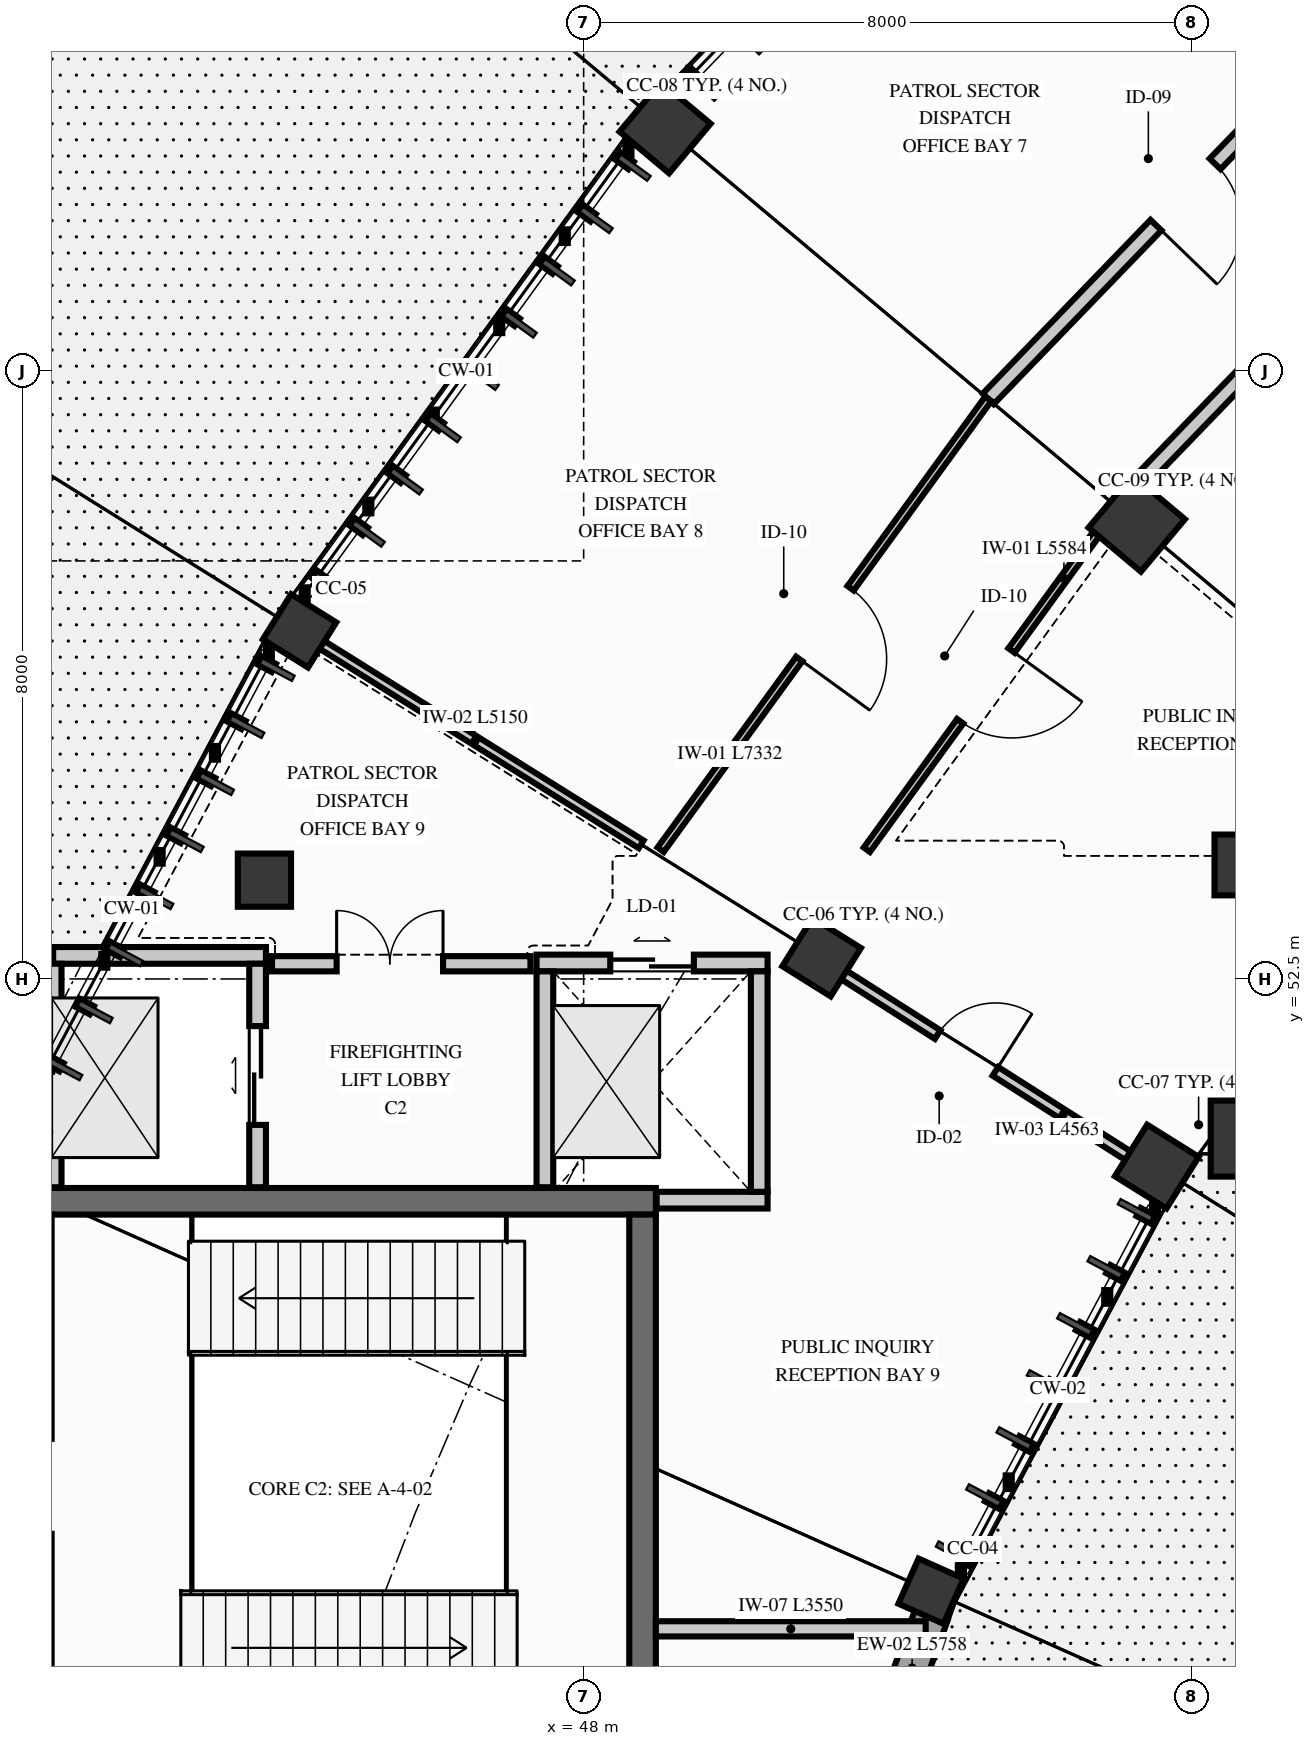
"""IFC4 building model, lengths in metres.
Left out: names, types, materials, properties, quantities, classifications, styles, units other than length and angle.
Written with IfcOpenShell. Run it as: python <this file> out.ifc"""

import sys

from ifc_helpers import new_model, si_unit, direction, frame, frame_2d, origin, origin_2d, place, context, subcontext, project, spatial, rectangle, extrude, element, fill, save


model = new_model("IFC4")
c1 = context("Model", 3, precision=1e-05, world=origin(), true_north=direction((0.0, 1.0)))
c2 = subcontext(c1, "Body", "Model", "MODEL_VIEW")
j1 = project(units=[si_unit("LENGTHUNIT", "METRE"), si_unit("PLANEANGLEUNIT", "RADIAN")], contexts=[c1])
p1 = place(None, origin())
s1 = spatial("IfcSite", under=j1, at=p1, CompositionType="ELEMENT")
p2 = place(p1, origin())
s2 = spatial("IfcBuilding", under=s1, at=p2, CompositionType="ELEMENT")
p3 = place(p2, origin())
s3 = spatial("IfcBuildingStorey", under=s2, at=p3, CompositionType="ELEMENT", Elevation=0.0)
p4 = place(p3, frame((40.65, 49.575, 0.0), z_axis=(0.0, 0.0, 1.0), x_axis=(1.0, 0.0, 0.0)))
e1 = element("IfcWall", 1, at=p4, inside=s3, PredefinedType="SHEAR", context=c2, shape_type="SweptSolid", body=[
    extrude(rectangle(XDim=8.3, YDim=0.35, at=frame_2d((4.15, 0.0))), origin(), (0.0, 0.0, 1.0), 4.88),
])
p5 = place(p3, frame((48.775, 42.6, 0.0), z_axis=(0.0, 0.0, 1.0), x_axis=(0.0, 1.0, 0.0)))
e2 = element("IfcWall", 2, at=p5, inside=s3, PredefinedType="SHEAR", context=c2, shape_type="SweptSolid", body=[
    extrude(rectangle(XDim=6.8, YDim=0.35, at=frame_2d((3.4, 0.0))), origin(), (0.0, 0.0, 1.0), 4.88),
])
p6 = place(p3, frame((55.277, 58.493, 0.0), z_axis=(0.0, 0.0, 1.0), x_axis=(0.642787609687, 0.766044443119, 0.0)))
e3 = element("IfcColumn", 3, at=p6, inside=s3, PredefinedType="COLUMN", context=c2, shape_type="SweptSolid", body=[
    extrude(rectangle(XDim=0.9, YDim=0.9, at=origin_2d()), origin(), (0.0, 0.0, 1.0), 5.1),
])
p7 = place(p3, frame((49.072, 63.699, 0.0), z_axis=(0.0, 0.0, 1.0), x_axis=(0.642787609687, 0.766044443119, 0.0)))
e4 = element("IfcColumn", 4, at=p7, inside=s3, PredefinedType="COLUMN", context=c2, shape_type="SweptSolid", body=[
    extrude(rectangle(XDim=0.85, YDim=0.85, at=origin_2d()), origin(), (0.0, 0.0, 1.0), 5.1),
])
p8 = place(p3, frame((55.541, 50.032, 0.0), z_axis=(0.0, 0.0, 1.0), x_axis=(0.529919264233, 0.848048096156, 0.0)))
e5 = element("IfcColumn", 5, at=p8, inside=s3, PredefinedType="COLUMN", context=c2, shape_type="SweptSolid", body=[
    extrude(rectangle(XDim=0.8, YDim=0.8, at=origin_2d()), origin(), (0.0, 0.0, 1.0), 5.1),
])
p9 = place(p3, frame((51.131, 52.787, 0.0), z_axis=(0.0, 0.0, 1.0), x_axis=(0.529919264233, 0.848048096156, 0.0)))
e6 = element("IfcColumn", 6, at=p9, inside=s3, PredefinedType="COLUMN", context=c2, shape_type="SweptSolid", body=[
    extrude(rectangle(XDim=0.75, YDim=0.75, at=origin_2d()), origin(), (0.0, 0.0, 1.0), 5.1),
])
p10 = place(p3, frame((44.262, 57.08, 0.0), z_axis=(0.0, 0.0, 1.0), x_axis=(0.529919264233, 0.848048096156, 0.0)))
e7 = element("IfcColumn", 7, at=p10, inside=s3, PredefinedType="COLUMN", context=c2, shape_type="SweptSolid", body=[
    extrude(rectangle(XDim=0.7, YDim=0.7, at=origin_2d()), origin(), (0.0, 0.0, 1.0), 5.1),
])
p11 = place(p3, frame((52.571, 44.446, 0.0), z_axis=(0.0, 0.0, 1.0), x_axis=(0.406736643076, 0.913545457643, 0.0)))
e8 = element("IfcColumn", 8, at=p11, inside=s3, PredefinedType="COLUMN", context=c2, shape_type="SweptSolid", body=[
    extrude(rectangle(XDim=0.65, YDim=0.65, at=origin_2d()), origin(), (0.0, 0.0, 1.0), 5.1),
])
p12 = place(p3, frame((43.8, 53.8, 0.0), z_axis=(0.0, 0.0, 1.0), x_axis=(1.0, 0.0, 0.0)))
e9 = element("IfcColumn", 9, at=p12, inside=s3, PredefinedType="COLUMN", context=c2, shape_type="SweptSolid", body=[
    extrude(rectangle(XDim=0.7, YDim=0.7, at=origin_2d()), origin(), (0.0, 0.0, 1.0), 5.1),
])
p13 = place(p3, frame((56.6, 54.0, 0.0), z_axis=(0.0, 0.0, 1.0), x_axis=(1.0, 0.0, 0.0)))
e10 = element("IfcColumn", 10, at=p13, inside=s3, PredefinedType="COLUMN", context=c2, shape_type="SweptSolid", body=[
    extrude(rectangle(XDim=0.6, YDim=0.8, at=origin_2d()), origin(), (0.0, 0.0, 1.0), 5.1),
])
p14 = place(p3, frame((56.6, 50.4, 0.0), z_axis=(0.0, 0.0, 1.0), x_axis=(1.0, 0.0, 0.0)))
e11 = element("IfcColumn", 11, at=p14, inside=s3, PredefinedType="COLUMN", context=c2, shape_type="SweptSolid", body=[
    extrude(rectangle(XDim=0.7, YDim=1.0, at=origin_2d()), origin(), (0.0, 0.0, 1.0), 5.1),
])
p15 = place(p3, frame((52.578, 44.14, 0.0), z_axis=(0.0, 0.0, 1.0), x_axis=(-0.342022226581, -0.939691862541, 0.0)))
e12 = element("IfcWall", 12, at=p15, inside=s3, PredefinedType="SOLIDWALL", context=c2, shape_type="SweptSolid", body=[
    extrude(rectangle(XDim=5.758, YDim=0.45, at=frame_2d((2.879, 0.0))), origin(), (0.0, 0.0, 1.0), 4.58),
])
p16 = place(p15, frame((1.5, 0.0, 0.0)))
e13 = element("IfcOpeningElement", 13, at=p16, cuts=e12, PredefinedType="OPENING", context=c2, shape_type="SweptSolid", body=[
    extrude(rectangle(XDim=1.8, YDim=2.4, at=frame_2d((0.9, 1.2))), frame((0.0, 0.235, 0.0), z_axis=(0.0, -1.0, 0.0), x_axis=(1.0, 0.0, 0.0)), (0.0, 0.0, 1.0), 0.47),
])
p17 = place(p3, frame((41.02, 52.81, 0.0), z_axis=(0.0, 0.0, 1.0), x_axis=(1.0, 0.0, 0.0)))
e14 = element("IfcWall", 14, at=p17, inside=s3, PredefinedType="PARTITIONING", context=c2, shape_type="SweptSolid", body=[
    extrude(rectangle(XDim=2.8, YDim=0.22, at=frame_2d((1.4, 0.0))), origin(), (0.0, 0.0, 1.0), 4.86),
])
p18 = place(p3, frame((41.02, 49.76, 0.0), z_axis=(0.0, 0.0, 1.0), x_axis=(0.0, 1.0, 0.0)))
e15 = element("IfcWall", 15, at=p18, inside=s3, PredefinedType="PARTITIONING", context=c2, shape_type="SweptSolid", body=[
    extrude(rectangle(XDim=2.94, YDim=0.22, at=frame_2d((1.47, 0.0))), origin(), (0.0, 0.0, 1.0), 4.86),
])
p19 = place(p3, frame((43.71, 49.76, 0.0), z_axis=(0.0, 0.0, 1.0), x_axis=(0.0, 1.0, 0.0)))
e16 = element("IfcWall", 16, at=p19, inside=s3, PredefinedType="PARTITIONING", context=c2, shape_type="SweptSolid", body=[
    extrude(rectangle(XDim=2.94, YDim=0.22, at=frame_2d((1.47, 0.0))), origin(), (0.0, 0.0, 1.0), 4.86),
])
p20 = place(p19, frame((0.82, 0.0, 0.0)))
e17 = element("IfcOpeningElement", 17, at=p20, cuts=e16, PredefinedType="OPENING", context=c2, shape_type="SweptSolid", body=[
    extrude(rectangle(XDim=1.3, YDim=2.2, at=frame_2d((0.65, 1.1))), frame((0.0, 0.12, 0.0), z_axis=(0.0, -1.0, 0.0), x_axis=(1.0, 0.0, 0.0)), (0.0, 0.0, 1.0), 0.24),
])
p21 = place(p3, frame((48.96, 49.59, 0.0), z_axis=(0.0, 0.0, 1.0), x_axis=(1.0, 0.0, 0.0)))
e18 = element("IfcWall", 18, at=p21, inside=s3, PredefinedType="PARTITIONING", context=c2, shape_type="SweptSolid", body=[
    extrude(rectangle(XDim=1.46, YDim=0.22, at=frame_2d((0.73, 0.0))), origin(), (0.0, 0.0, 1.0), 4.86),
])
p22 = place(p3, frame((47.38, 52.71, 0.0), z_axis=(0.0, 0.0, 1.0), x_axis=(1.0, 0.0, 0.0)))
e19 = element("IfcWall", 19, at=p22, inside=s3, PredefinedType="PARTITIONING", context=c2, shape_type="SweptSolid", body=[
    extrude(rectangle(XDim=3.04, YDim=0.22, at=frame_2d((1.52, 0.0))), origin(), (0.0, 0.0, 1.0), 4.86),
])
p23 = place(p22, frame((0.97, 0.0, 0.0)))
e20 = element("IfcOpeningElement", 20, at=p23, cuts=e19, PredefinedType="OPENING", context=c2, shape_type="SweptSolid", body=[
    extrude(rectangle(XDim=1.1, YDim=2.15, at=frame_2d((0.55, 1.075))), frame((0.0, 0.12, 0.0), z_axis=(0.0, -1.0, 0.0), x_axis=(1.0, 0.0, 0.0)), (0.0, 0.0, 1.0), 0.24),
])
p24 = place(p3, frame((47.49, 49.76, 0.0), z_axis=(0.0, 0.0, 1.0), x_axis=(0.0, 1.0, 0.0)))
e21 = element("IfcWall", 21, at=p24, inside=s3, PredefinedType="PARTITIONING", context=c2, shape_type="SweptSolid", body=[
    extrude(rectangle(XDim=2.84, YDim=0.22, at=frame_2d((1.42, 0.0))), origin(), (0.0, 0.0, 1.0), 4.86),
])
p25 = place(p3, frame((50.31, 49.7, 0.0), z_axis=(0.0, 0.0, 1.0), x_axis=(0.0, 1.0, 0.0)))
e22 = element("IfcWall", 22, at=p25, inside=s3, PredefinedType="PARTITIONING", context=c2, shape_type="SweptSolid", body=[
    extrude(rectangle(XDim=2.9, YDim=0.22, at=frame_2d((1.45, 0.0))), origin(), (0.0, 0.0, 1.0), 4.86),
])
p26 = place(p3, frame((43.9, 52.7, 0.0), z_axis=(0.0, 0.0, 1.0), x_axis=(1.0, 0.0, 0.0)))
e23 = element("IfcWall", 23, at=p26, inside=s3, PredefinedType="PARTITIONING", context=c2, shape_type="SweptSolid", body=[
    extrude(rectangle(XDim=3.4, YDim=0.2, at=frame_2d((1.7, 0.0))), origin(), (0.0, 0.0, 1.0), 4.86),
])
p27 = place(p26, frame((0.85, 0.0, 0.0)))
e24 = element("IfcOpeningElement", 24, at=p27, cuts=e23, PredefinedType="OPENING", context=c2, shape_type="SweptSolid", body=[
    extrude(rectangle(XDim=1.4, YDim=2.25, at=frame_2d((0.7, 1.125))), frame((0.0, 0.11, 0.0), z_axis=(0.0, -1.0, 0.0), x_axis=(1.0, 0.0, 0.0)), (0.0, 0.0, 1.0), 0.22),
])
p28 = place(p3, frame((48.95, 43.95, 0.0), z_axis=(0.0, 0.0, 1.0), x_axis=(1.0, 0.0, 0.0)))
e25 = element("IfcWall", 25, at=p28, inside=s3, PredefinedType="PARTITIONING", context=c2, shape_type="SweptSolid", body=[
    extrude(rectangle(XDim=3.55, YDim=0.2, at=frame_2d((1.775, 0.0))), origin(), (0.0, 0.0, 1.0), 4.578),
])
p29 = place(p3, frame((51.35, 52.6, 0.0), z_axis=(0.0, 0.0, 1.0), x_axis=(0.84363284859, -0.536920493909, 0.0)))
e26 = element("IfcWall", 26, at=p29, inside=s3, PredefinedType="PARTITIONING", context=c2, shape_type="SweptSolid", body=[
    extrude(rectangle(XDim=4.563, YDim=0.135, at=frame_2d((2.282, 0.0))), origin(), (0.0, 0.0, 1.0), 4.48),
])
p30 = place(p29, frame((1.55, 0.0, 0.0)))
e27 = element("IfcOpeningElement", 27, at=p30, cuts=e26, PredefinedType="OPENING", context=c2, shape_type="SweptSolid", body=[
    extrude(rectangle(XDim=0.9, YDim=2.1, at=frame_2d((0.45, 1.05))), frame((0.0, 0.077, 0.0), z_axis=(0.0, -1.0, 0.0), x_axis=(1.0, 0.0, 0.0)), (0.0, 0.0, 1.0), 0.155),
])
p31 = place(p3, frame((59.941, 63.826, 0.0), z_axis=(0.0, 0.0, 1.0), x_axis=(-0.694674270111, -0.719324445884, 0.0)))
e28 = element("IfcWall", 28, at=p31, inside=s3, PredefinedType="PARTITIONING", context=c2, shape_type="SweptSolid", body=[
    extrude(rectangle(XDim=7.101, YDim=0.2, at=frame_2d((3.551, 0.0))), origin(), (0.0, 0.0, 1.0), 4.86),
])
p32 = place(p31, frame((2.983, 0.0, 0.0)))
e29 = element("IfcOpeningElement", 29, at=p32, cuts=e28, PredefinedType="OPENING", context=c2, shape_type="SweptSolid", body=[
    extrude(rectangle(XDim=1.12, YDim=2.2, at=frame_2d((0.56, 1.1))), frame((0.0, 0.11, 0.0), z_axis=(0.0, -1.0, 0.0), x_axis=(1.0, 0.0, 0.0)), (0.0, 0.0, 1.0), 0.22),
])
p33 = place(p3, frame((58.469, 65.461, 0.0), z_axis=(0.0, 0.0, 1.0), x_axis=(-0.694673907436, -0.71932479613, 0.0)))
e30 = element("IfcWall", 30, at=p33, inside=s3, PredefinedType="PARTITIONING", context=c2, shape_type="SweptSolid", body=[
    extrude(rectangle(XDim=7.408, YDim=0.2, at=frame_2d((3.704, 0.0))), origin(), (0.0, 0.0, 1.0), 4.86),
])
p34 = place(p33, frame((3.111, 0.0, 0.0)))
e31 = element("IfcOpeningElement", 31, at=p34, cuts=e30, PredefinedType="OPENING", context=c2, shape_type="SweptSolid", body=[
    extrude(rectangle(XDim=1.12, YDim=2.2, at=frame_2d((0.56, 1.1))), frame((0.0, 0.11, 0.0), z_axis=(0.0, -1.0, 0.0), x_axis=(1.0, 0.0, 0.0)), (0.0, 0.0, 1.0), 0.22),
])
p35 = place(p3, frame((55.008, 58.718, 0.0), z_axis=(0.0, 0.0, 1.0), x_axis=(-0.587773920785, -0.809025227076, 0.0)))
e32 = element("IfcWall", 32, at=p35, inside=s3, PredefinedType="PARTITIONING", context=c2, shape_type="SweptSolid", body=[
    extrude(rectangle(XDim=5.584, YDim=0.1, at=frame_2d((2.792, 0.0))), origin(), (0.0, 0.0, 1.0), 4.86),
])
p36 = place(p35, frame((2.345, 0.0, 0.0)))
e33 = element("IfcOpeningElement", 33, at=p36, cuts=e32, PredefinedType="OPENING", context=c2, shape_type="SweptSolid", body=[
    extrude(rectangle(XDim=1.15, YDim=2.2, at=frame_2d((0.575, 1.1))), frame((0.0, 0.06, 0.0), z_axis=(0.0, -1.0, 0.0), x_axis=(1.0, 0.0, 0.0)), (0.0, 0.0, 1.0), 0.12),
])
p37 = place(p3, frame((53.323, 60.132, 0.0), z_axis=(0.0, 0.0, 1.0), x_axis=(-0.587773694682, -0.809025391344, 0.0)))
e34 = element("IfcWall", 34, at=p37, inside=s3, PredefinedType="PARTITIONING", context=c2, shape_type="SweptSolid", body=[
    extrude(rectangle(XDim=7.333, YDim=0.1, at=frame_2d((3.666, 0.0))), origin(), (0.0, 0.0, 1.0), 4.86),
])
p38 = place(p37, frame((3.08, 0.0, 0.0)))
e35 = element("IfcOpeningElement", 35, at=p38, cuts=e34, PredefinedType="OPENING", context=c2, shape_type="SweptSolid", body=[
    extrude(rectangle(XDim=1.15, YDim=2.2, at=frame_2d((0.575, 1.1))), frame((0.0, 0.06, 0.0), z_axis=(0.0, -1.0, 0.0), x_axis=(1.0, 0.0, 0.0)), (0.0, 0.0, 1.0), 0.12),
])
p39 = place(p3, frame((48.757, 54.271, 0.0), z_axis=(0.0, 0.0, 1.0), x_axis=(-0.848054228257, 0.529909450694, 0.0)))
e36 = element("IfcWall", 36, at=p39, inside=s3, PredefinedType="PARTITIONING", context=c2, shape_type="SweptSolid", body=[
    extrude(rectangle(XDim=5.15, YDim=0.12, at=frame_2d((2.575, 0.0))), origin(), (0.0, 0.0, 1.0), 4.43),
])
p40 = place(p20, origin())
e37 = element("IfcDoor", 37, at=p40, inside=s3, OperationType="DOUBLE_DOOR_SLIDING", PredefinedType="DOOR", context=c2, shape_type="SweptSolid", body=[
    extrude(rectangle(XDim=1.3, YDim=2.2, at=frame_2d((0.65, 1.1))), frame((0.0, 0.025, 0.0), z_axis=(0.0, -1.0, 0.0), x_axis=(1.0, 0.0, 0.0)), (0.0, 0.0, 1.0), 0.05),
])
fill(e17, e37)
p41 = place(p23, origin())
e38 = element("IfcDoor", 38, at=p41, inside=s3, OperationType="DOUBLE_DOOR_SLIDING", PredefinedType="DOOR", context=c2, shape_type="SweptSolid", body=[
    extrude(rectangle(XDim=1.1, YDim=2.15, at=frame_2d((0.55, 1.075))), frame((0.0, 0.025, 0.0), z_axis=(0.0, -1.0, 0.0), x_axis=(1.0, 0.0, 0.0)), (0.0, 0.0, 1.0), 0.05),
])
fill(e20, e38)
p42 = place(p27, origin())
e39 = element("IfcDoor", 39, at=p42, inside=s3, OperationType="DOUBLE_DOOR_SINGLE_SWING", PredefinedType="DOOR", context=c2, shape_type="SweptSolid", body=[
    extrude(rectangle(XDim=1.4, YDim=2.25, at=frame_2d((0.7, 1.125))), frame((0.0, 0.025, 0.0), z_axis=(0.0, -1.0, 0.0), x_axis=(1.0, 0.0, 0.0)), (0.0, 0.0, 1.0), 0.05),
])
fill(e24, e39)
p43 = place(p30, origin())
e40 = element("IfcDoor", 40, at=p43, inside=s3, OperationType="SINGLE_SWING_RIGHT", PredefinedType="DOOR", context=c2, shape_type="SweptSolid", body=[
    extrude(rectangle(XDim=0.9, YDim=2.1, at=frame_2d((0.45, 1.05))), frame((0.0, 0.025, 0.0), z_axis=(0.0, -1.0, 0.0), x_axis=(1.0, 0.0, 0.0)), (0.0, 0.0, 1.0), 0.05),
])
fill(e27, e40)
p44 = place(p34, origin())
e41 = element("IfcDoor", 41, at=p44, inside=s3, OperationType="SINGLE_SWING_RIGHT", PredefinedType="DOOR", context=c2, shape_type="SweptSolid", body=[
    extrude(rectangle(XDim=1.12, YDim=2.2, at=frame_2d((0.56, 1.1))), frame((0.0, 0.025, 0.0), z_axis=(0.0, -1.0, 0.0), x_axis=(1.0, 0.0, 0.0)), (0.0, 0.0, 1.0), 0.05),
])
fill(e31, e41)
p45 = place(p36, origin())
e42 = element("IfcDoor", 42, at=p45, inside=s3, OperationType="SINGLE_SWING_LEFT", PredefinedType="DOOR", context=c2, shape_type="SweptSolid", body=[
    extrude(rectangle(XDim=1.15, YDim=2.2, at=frame_2d((0.575, 1.1))), frame((0.0, 0.025, 0.0), z_axis=(0.0, -1.0, 0.0), x_axis=(1.0, 0.0, 0.0)), (0.0, 0.0, 1.0), 0.05),
])
fill(e33, e42)
p46 = place(p38, origin())
e43 = element("IfcDoor", 43, at=p46, inside=s3, OperationType="SINGLE_SWING_RIGHT", PredefinedType="DOOR", context=c2, shape_type="SweptSolid", body=[
    extrude(rectangle(XDim=1.15, YDim=2.2, at=frame_2d((0.575, 1.1))), frame((0.0, 0.025, 0.0), z_axis=(0.0, -1.0, 0.0), x_axis=(1.0, 0.0, 0.0)), (0.0, 0.0, 1.0), 0.05),
])
fill(e35, e43)
save(model, sys.argv[1])
